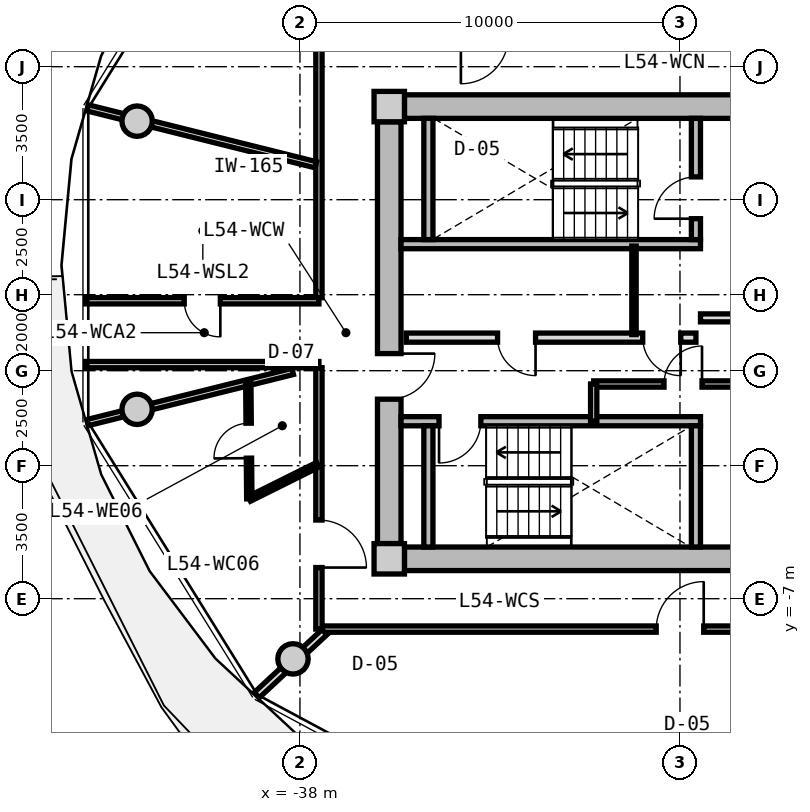
"""IFC4 building model, lengths in metres.
Left out: names, types, materials, properties, quantities, classifications, styles, units other than length and angle.
Written with IfcOpenShell. Run it as: python <this file> out.ifc"""

import sys

from ifc_helpers import new_model, si_unit, direction, frame, frame_2d, origin, origin_2d, place, context, subcontext, project, spatial, rectangle, circle, extrude, source, transform, mapped, element, fill, save


model = new_model("IFC4")
c1 = context("Model", 3, precision=1e-05, world=origin(), true_north=direction((0.0, 1.0)))
c2 = subcontext(c1, "Body", "Model", "MODEL_VIEW")
j1 = project(units=[si_unit("LENGTHUNIT", "METRE"), si_unit("PLANEANGLEUNIT", "RADIAN")], contexts=[c1])
p1 = place(None, origin())
s1 = spatial("IfcSite", under=j1, at=p1, CompositionType="ELEMENT")
p2 = place(p1, origin())
s2 = spatial("IfcBuilding", under=s1, at=p2, CompositionType="ELEMENT")
p3 = place(p2, frame((0.0, 0.0, 173.95)))
s3 = spatial("IfcBuildingStorey", under=s2, at=p3, CompositionType="ELEMENT", Elevation=173.95)
m1 = source(origin(), c2, "Body", "SweptSolid", [
    extrude(rectangle(XDim=0.8, YDim=0.8, at=origin_2d()), origin(), (0.0, 0.0, 1.0), 3.05),
])
for number, where, z_axis, x_axis in (
    (1, (-35.65, -5.95, 0.0), (0.0, 0.0, 1.0), (1.0, 0.0, 0.0)),
    (2, (-35.65, 5.95, 0.0), (0.0, 0.0, 1.0), (1.0, 0.0, 0.0)),
):
    element("IfcColumn", number, at=place(p3, frame(where, z_axis=z_axis, x_axis=x_axis)), inside=s3, PredefinedType="COLUMN", context=c2, shape_type="MappedRepresentation", body=[
        mapped(m1, transform((0.0, 0.0, 0.0), x_axis=(1.0, 0.0, 0.0), y_axis=(0.0, 1.0, 0.0), z_axis=(0.0, 0.0, 1.0), scale=1.0)),
    ])
m2 = source(origin(), c2, "Body", "SweptSolid", [
    extrude(rectangle(XDim=14.5, YDim=0.62, at=frame_2d((7.25, 0.0))), origin(), (0.0, 0.0, 1.0), 2.81),
])
for number, where, z_axis, x_axis in (
    (3, (-35.25, 5.95, 0.0), (0.0, 0.0, 1.0), (1.0, 0.0, 0.0)),
    (4, (-20.75, -5.95, 0.0), (0.0, 0.0, 1.0), (-1.0, 0.0, 0.0)),
):
    element("IfcWall", number, at=place(p3, frame(where, z_axis=z_axis, x_axis=x_axis)), inside=s3, PredefinedType="SHEAR", context=c2, shape_type="MappedRepresentation", body=[
        mapped(m2, transform((0.0, 0.0, 0.0), x_axis=(1.0, 0.0, 0.0), y_axis=(0.0, 1.0, 0.0), z_axis=(0.0, 0.0, 1.0), scale=1.0)),
    ])
m3 = source(origin(), c2, "Body", "SweptSolid", [
    extrude(rectangle(XDim=11.1, YDim=0.62, at=frame_2d((5.55, 0.0))), origin(), (0.0, 0.0, 1.0), 2.81),
])
p4 = place(p3, frame((-35.65, -5.55, 0.0), z_axis=(0.0, 0.0, 1.0), x_axis=(0.0, 1.0, 0.0)))
e5 = element("IfcWall", 5, at=p4, inside=s3, PredefinedType="SHEAR", context=c2, shape_type="MappedRepresentation", body=[
    mapped(m3, transform((0.0, 0.0, 0.0), x_axis=(1.0, 0.0, 0.0), y_axis=(0.0, 1.0, 0.0), z_axis=(0.0, 0.0, 1.0), scale=1.0)),
])
p5 = place(p4, frame((3.8, 0.0, 0.0)))
e6 = element("IfcOpeningElement", 6, at=p5, cuts=e5, PredefinedType="OPENING", context=c2, shape_type="SweptSolid", body=[
    extrude(rectangle(XDim=1.2, YDim=2.15, at=frame_2d((0.6, 1.075))), frame((0.0, 0.32, 0.0), z_axis=(0.0, -1.0, 0.0), x_axis=(1.0, 0.0, 0.0)), (0.0, 0.0, 1.0), 0.64),
])
m4 = source(origin(), c2, "Body", "SweptSolid", [
    extrude(circle(Radius=0.4, at=origin_2d()), origin(), (0.0, 0.0, 1.0), 3.05),
])
for number, where, z_axis, x_axis in (
    (7, (-42.285, 5.567, 0.0), (0.0, 0.0, 1.0), (1.0, 0.0, 0.0)),
    (8, (-42.285, -2.016, 0.0), (0.0, 0.0, 1.0), (1.0, 0.0, 0.0)),
    (9, (-38.183, -8.584, 0.0), (0.0, 0.0, 1.0), (1.0, 0.0, 0.0)),
):
    element("IfcColumn", number, at=place(p3, frame(where, z_axis=z_axis, x_axis=x_axis)), inside=s3, PredefinedType="COLUMN", context=c2, shape_type="MappedRepresentation", body=[
        mapped(m4, transform((0.0, 0.0, 0.0), x_axis=(1.0, 0.0, 0.0), y_axis=(0.0, 1.0, 0.0), z_axis=(0.0, 0.0, 1.0), scale=1.0)),
    ])
m5 = source(origin(), c2, "Body", "SweptSolid", [
    extrude(rectangle(XDim=7.88, YDim=0.24, at=frame_2d((3.94, 0.0))), origin(), (0.0, 0.0, 1.0), 2.81),
])
p6 = place(p3, frame((-35.34, 2.33, 0.0), z_axis=(0.0, 0.0, 1.0), x_axis=(1.0, 0.0, 0.0)))
e10 = element("IfcWall", 10, at=p6, inside=s3, PredefinedType="PARTITIONING", context=c2, shape_type="MappedRepresentation", body=[
    mapped(m5, transform((0.0, 0.0, 0.0), x_axis=(1.0, 0.0, 0.0), y_axis=(0.0, 1.0, 0.0), z_axis=(0.0, 0.0, 1.0), scale=1.0)),
])
m6 = source(origin(), c2, "Body", "SweptSolid", [
    extrude(rectangle(XDim=3.19, YDim=0.24, at=frame_2d((1.595, 0.0))), origin(), (0.0, 0.0, 1.0), 2.81),
])
p7 = place(p3, frame((-34.62, 2.45, 0.0), z_axis=(0.0, 0.0, 1.0), x_axis=(0.0, 1.0, 0.0)))
e11 = element("IfcWall", 11, at=p7, inside=s3, PredefinedType="PARTITIONING", context=c2, shape_type="MappedRepresentation", body=[
    mapped(m6, transform((0.0, 0.0, 0.0), x_axis=(1.0, 0.0, 0.0), y_axis=(0.0, 1.0, 0.0), z_axis=(0.0, 0.0, 1.0), scale=1.0)),
])
p8 = place(p3, frame((-27.58, 2.45, 0.0), z_axis=(0.0, 0.0, 1.0), x_axis=(0.0, 1.0, 0.0)))
e12 = element("IfcWall", 12, at=p8, inside=s3, PredefinedType="PARTITIONING", context=c2, shape_type="MappedRepresentation", body=[
    mapped(m6, transform((0.0, 0.0, 0.0), x_axis=(1.0, 0.0, 0.0), y_axis=(0.0, 1.0, 0.0), z_axis=(0.0, 0.0, 1.0), scale=1.0)),
])
p9 = place(p8, frame((0.55, 0.0, 0.0)))
e13 = element("IfcOpeningElement", 13, at=p9, cuts=e12, PredefinedType="OPENING", context=c2, shape_type="SweptSolid", body=[
    extrude(rectangle(XDim=1.1, YDim=2.15, at=frame_2d((0.55, 1.075))), frame((0.0, 0.13, 0.0), z_axis=(0.0, -1.0, 0.0), x_axis=(1.0, 0.0, 0.0)), (0.0, 0.0, 1.0), 0.26),
])
p10 = place(p3, frame((-35.34, -2.33, 0.0), z_axis=(0.0, 0.0, 1.0), x_axis=(1.0, 0.0, 0.0)))
e14 = element("IfcWall", 14, at=p10, inside=s3, PredefinedType="PARTITIONING", context=c2, shape_type="MappedRepresentation", body=[
    mapped(m5, transform((0.0, 0.0, 0.0), x_axis=(1.0, 0.0, 0.0), y_axis=(0.0, 1.0, 0.0), z_axis=(0.0, 0.0, 1.0), scale=1.0)),
])
p11 = place(p10, frame((1.0, 0.0, 0.0)))
e15 = element("IfcOpeningElement", 15, at=p11, cuts=e14, PredefinedType="OPENING", context=c2, shape_type="SweptSolid", body=[
    extrude(rectangle(XDim=1.1, YDim=2.15, at=frame_2d((0.55, 1.075))), frame((0.0, 0.13, 0.0), z_axis=(0.0, -1.0, 0.0), x_axis=(1.0, 0.0, 0.0)), (0.0, 0.0, 1.0), 0.26),
])
for number, where, z_axis, x_axis in (
    (16, (-34.62, -5.64, 0.0), (0.0, 0.0, 1.0), (0.0, 1.0, 0.0)),
    (17, (-27.58, -5.64, 0.0), (0.0, 0.0, 1.0), (0.0, 1.0, 0.0)),
):
    element("IfcWall", number, at=place(p3, frame(where, z_axis=z_axis, x_axis=x_axis)), inside=s3, PredefinedType="PARTITIONING", context=c2, shape_type="MappedRepresentation", body=[
        mapped(m6, transform((0.0, 0.0, 0.0), x_axis=(1.0, 0.0, 0.0), y_axis=(0.0, 1.0, 0.0), z_axis=(0.0, 0.0, 1.0), scale=1.0)),
    ])
m7 = source(origin(), c2, "Body", "SweptSolid", [
    extrude(rectangle(XDim=6.66, YDim=0.21, at=frame_2d((3.33, 0.0))), origin(), (0.0, 0.0, 1.0), 2.795),
])
p12 = place(p3, frame((-27.46, 0.39, 0.0), z_axis=(0.0, 0.0, 1.0), x_axis=(1.0, 0.0, 0.0)))
e18 = element("IfcWall", 18, at=p12, inside=s3, PredefinedType="PARTITIONING", context=c2, shape_type="MappedRepresentation", body=[
    mapped(m7, transform((0.0, 0.0, 0.0), x_axis=(1.0, 0.0, 0.0), y_axis=(0.0, 1.0, 0.0), z_axis=(0.0, 0.0, 1.0), scale=1.0)),
])
p13 = place(p12, frame((1.0, 0.0, 0.0)))
e19 = element("IfcOpeningElement", 19, at=p13, cuts=e18, PredefinedType="OPENING", context=c2, shape_type="SweptSolid", body=[
    extrude(rectangle(XDim=1.2, YDim=2.15, at=frame_2d((0.6, 1.075))), frame((0.0, 0.115, 0.0), z_axis=(0.0, -1.0, 0.0), x_axis=(1.0, 0.0, 0.0)), (0.0, 0.0, 1.0), 0.23),
])
m8 = source(origin(), c2, "Body", "SweptSolid", [
    extrude(rectangle(XDim=7.62, YDim=0.24, at=frame_2d((3.81, 0.0))), origin(), (0.0, 0.0, 1.0), 2.795),
])
p14 = place(p3, frame((-35.2, -0.13, 0.0), z_axis=(0.0, 0.0, 1.0), x_axis=(1.0, 0.0, 0.0)))
e20 = element("IfcWall", 20, at=p14, inside=s3, PredefinedType="PARTITIONING", context=c2, shape_type="MappedRepresentation", body=[
    mapped(m8, transform((0.0, 0.0, 0.0), x_axis=(1.0, 0.0, 0.0), y_axis=(0.0, 1.0, 0.0), z_axis=(0.0, 0.0, 1.0), scale=1.0)),
])
p15 = place(p14, frame((6.22, 0.0, 0.0)))
e21 = element("IfcOpeningElement", 21, at=p15, cuts=e20, PredefinedType="OPENING", context=c2, shape_type="SweptSolid", body=[
    extrude(rectangle(XDim=1.0, YDim=2.1, at=frame_2d((0.5, 1.05))), frame((0.0, 0.13, 0.0), z_axis=(0.0, -1.0, 0.0), x_axis=(1.0, 0.0, 0.0)), (0.0, 0.0, 1.0), 0.26),
])
p16 = place(p14, frame((2.4, 0.0, 0.0)))
e22 = element("IfcOpeningElement", 22, at=p16, cuts=e20, PredefinedType="OPENING", context=c2, shape_type="SweptSolid", body=[
    extrude(rectangle(XDim=1.0, YDim=2.1, at=frame_2d((0.5, 1.05))), frame((0.0, 0.13, 0.0), z_axis=(0.0, -1.0, 0.0), x_axis=(1.0, 0.0, 0.0)), (0.0, 0.0, 1.0), 0.26),
])
m9 = source(origin(), c2, "Body", "SweptSolid", [
    extrude(rectangle(XDim=2.33, YDim=0.115, at=frame_2d((1.165, 0.0))), origin(), (0.0, 0.0, 1.0), 2.795),
])
p17 = place(p3, frame((-29.21, -0.05, 0.0), z_axis=(0.0, 0.0, 1.0), x_axis=(0.0, 1.0, 0.0)))
e23 = element("IfcWall", 23, at=p17, inside=s3, PredefinedType="PARTITIONING", context=c2, shape_type="MappedRepresentation", body=[
    mapped(m9, transform((0.0, 0.0, 0.0), x_axis=(1.0, 0.0, 0.0), y_axis=(0.0, 1.0, 0.0), z_axis=(0.0, 0.0, 1.0), scale=1.0)),
])
m10 = source(origin(), c2, "Body", "SweptSolid", [
    extrude(rectangle(XDim=4.77, YDim=0.165, at=frame_2d((2.385, 0.0))), origin(), (0.0, 0.0, 1.0), 2.795),
])
p18 = place(p3, frame((-30.27, -1.35, 0.0), z_axis=(0.0, 0.0, 1.0), x_axis=(1.0, 0.0, 0.0)))
e24 = element("IfcWall", 24, at=p18, inside=s3, PredefinedType="PARTITIONING", context=c2, shape_type="MappedRepresentation", body=[
    mapped(m10, transform((0.0, 0.0, 0.0), x_axis=(1.0, 0.0, 0.0), y_axis=(0.0, 1.0, 0.0), z_axis=(0.0, 0.0, 1.0), scale=1.0)),
])
p19 = place(p18, frame((1.85, 0.0, 0.0)))
e25 = element("IfcOpeningElement", 25, at=p19, cuts=e24, PredefinedType="OPENING", context=c2, shape_type="SweptSolid", body=[
    extrude(rectangle(XDim=1.0, YDim=2.1, at=frame_2d((0.5, 1.05))), frame((0.0, 0.093, 0.0), z_axis=(0.0, -1.0, 0.0), x_axis=(1.0, 0.0, 0.0)), (0.0, 0.0, 1.0), 0.185),
])
m11 = source(origin(), c2, "Body", "SweptSolid", [
    extrude(rectangle(XDim=0.98, YDim=0.165, at=frame_2d((0.49, 0.0))), origin(), (0.0, 0.0, 1.0), 2.795),
])
p20 = place(p3, frame((-30.27, -2.33, 0.0), z_axis=(0.0, 0.0, 1.0), x_axis=(0.0, 1.0, 0.0)))
e26 = element("IfcWall", 26, at=p20, inside=s3, PredefinedType="PARTITIONING", context=c2, shape_type="MappedRepresentation", body=[
    mapped(m11, transform((0.0, 0.0, 0.0), x_axis=(1.0, 0.0, 0.0), y_axis=(0.0, 1.0, 0.0), z_axis=(0.0, 0.0, 1.0), scale=1.0)),
])
m12 = source(origin(), c2, "Body", "SweptSolid", [
    extrude(rectangle(XDim=19.0, YDim=0.165, at=frame_2d((9.5, 0.0))), origin(), (0.0, 0.0, 1.0), 2.795),
])
p21 = place(p3, frame((-18.5, -7.8, 0.0), z_axis=(0.0, 0.0, 1.0), x_axis=(-1.0, 0.0, 0.0)))
e27 = element("IfcWall", 27, at=p21, inside=s3, PredefinedType="PARTITIONING", context=c2, shape_type="MappedRepresentation", body=[
    mapped(m12, transform((0.0, 0.0, 0.0), x_axis=(1.0, 0.0, 0.0), y_axis=(0.0, 1.0, 0.0), z_axis=(0.0, 0.0, 1.0), scale=1.0)),
])
p22 = place(p21, frame((8.875, 0.0, 0.0)))
e28 = element("IfcOpeningElement", 28, at=p22, cuts=e27, PredefinedType="OPENING", context=c2, shape_type="SweptSolid", body=[
    extrude(rectangle(XDim=1.25, YDim=2.2, at=frame_2d((0.625, 1.1))), frame((0.0, 0.093, 0.0), z_axis=(0.0, -1.0, 0.0), x_axis=(1.0, 0.0, 0.0)), (0.0, 0.0, 1.0), 0.185),
])
m13 = source(origin(), c2, "Body", "SweptSolid", [
    extrude(rectangle(XDim=6.88, YDim=0.165, at=frame_2d((3.44, 0.0))), origin(), (0.0, 0.0, 1.0), 2.795),
])
p23 = place(p3, frame((-37.5, -7.8, 0.0), z_axis=(0.0, 0.0, 1.0), x_axis=(0.0, 1.0, 0.0)))
e29 = element("IfcWall", 29, at=p23, inside=s3, PredefinedType="PARTITIONING", context=c2, shape_type="MappedRepresentation", body=[
    mapped(m13, transform((0.0, 0.0, 0.0), x_axis=(1.0, 0.0, 0.0), y_axis=(0.0, 1.0, 0.0), z_axis=(0.0, 0.0, 1.0), scale=1.0)),
])
p24 = place(p23, frame((1.62, 0.0, 0.0)))
e30 = element("IfcOpeningElement", 30, at=p24, cuts=e29, PredefinedType="OPENING", context=c2, shape_type="SweptSolid", body=[
    extrude(rectangle(XDim=1.25, YDim=2.2, at=frame_2d((0.625, 1.1))), frame((0.0, 0.093, 0.0), z_axis=(0.0, -1.0, 0.0), x_axis=(1.0, 0.0, 0.0)), (0.0, 0.0, 1.0), 0.185),
])
p25 = place(p3, frame((-37.5, 0.92, 0.0), z_axis=(0.0, 0.0, 1.0), x_axis=(0.0, 1.0, 0.0)))
e31 = element("IfcWall", 31, at=p25, inside=s3, PredefinedType="PARTITIONING", context=c2, shape_type="MappedRepresentation", body=[
    mapped(m13, transform((0.0, 0.0, 0.0), x_axis=(1.0, 0.0, 0.0), y_axis=(0.0, 1.0, 0.0), z_axis=(0.0, 0.0, 1.0), scale=1.0)),
])
m14 = source(origin(), c2, "Body", "SweptSolid", [
    extrude(rectangle(XDim=6.193, YDim=0.165, at=frame_2d((3.096, 0.0))), origin(), (0.0, 0.0, 1.0), 2.345),
])
p26 = place(p3, frame((-37.58, 4.419, 0.0), z_axis=(0.0, 0.0, 1.0), x_axis=(-0.970309243466, 0.241867674657, 0.0)))
e32 = element("IfcWall", 32, at=p26, inside=s3, PredefinedType="PARTITIONING", context=c2, shape_type="MappedRepresentation", body=[
    mapped(m14, transform((0.0, 0.0, 0.0), x_axis=(1.0, 0.0, 0.0), y_axis=(0.0, 1.0, 0.0), z_axis=(0.0, 0.0, 1.0), scale=1.0)),
])
m15 = source(origin(), c2, "Body", "SweptSolid", [
    extrude(rectangle(XDim=5.564, YDim=0.165, at=frame_2d((2.782, 0.0))), origin(), (0.0, 0.0, 1.0), 2.345),
])
p27 = place(p3, frame((-38.19, -1.02, 0.0), z_axis=(0.0, 0.0, 1.0), x_axis=(-0.97031260977, -0.241854169533, 0.0)))
e33 = element("IfcWall", 33, at=p27, inside=s3, PredefinedType="PARTITIONING", context=c2, shape_type="MappedRepresentation", body=[
    mapped(m15, transform((0.0, 0.0, 0.0), x_axis=(1.0, 0.0, 0.0), y_axis=(0.0, 1.0, 0.0), z_axis=(0.0, 0.0, 1.0), scale=1.0)),
])
m16 = source(origin(), c2, "Body", "SweptSolid", [
    extrude(rectangle(XDim=6.139, YDim=0.165, at=frame_2d((3.069, 0.0))), origin(), (0.0, 0.0, 1.0), 2.795),
])
p28 = place(p3, frame((-43.639, 0.84, 0.0), z_axis=(0.0, 0.0, 1.0), x_axis=(1.0, 0.0, 0.0)))
e34 = element("IfcWall", 34, at=p28, inside=s3, PredefinedType="PARTITIONING", context=c2, shape_type="MappedRepresentation", body=[
    mapped(m16, transform((0.0, 0.0, 0.0), x_axis=(1.0, 0.0, 0.0), y_axis=(0.0, 1.0, 0.0), z_axis=(0.0, 0.0, 1.0), scale=1.0)),
])
p29 = place(p28, frame((2.594, 0.0, 0.0)))
e35 = element("IfcOpeningElement", 35, at=p29, cuts=e34, PredefinedType="OPENING", context=c2, shape_type="SweptSolid", body=[
    extrude(rectangle(XDim=0.95, YDim=2.1, at=frame_2d((0.475, 1.05))), frame((0.0, 0.093, 0.0), z_axis=(0.0, -1.0, 0.0), x_axis=(1.0, 0.0, 0.0)), (0.0, 0.0, 1.0), 0.185),
])
p30 = place(p3, frame((-37.5, -0.84, 0.0), z_axis=(0.0, 0.0, 1.0), x_axis=(-1.0, 0.0, 0.0)))
e36 = element("IfcWall", 36, at=p30, inside=s3, PredefinedType="PARTITIONING", context=c2, shape_type="MappedRepresentation", body=[
    mapped(m16, transform((0.0, 0.0, 0.0), x_axis=(1.0, 0.0, 0.0), y_axis=(0.0, 1.0, 0.0), z_axis=(0.0, 0.0, 1.0), scale=1.0)),
])
m17 = source(origin(), c2, "Body", "SweptSolid", [
    extrude(rectangle(XDim=2.435, YDim=0.19, at=frame_2d((1.217, 0.0))), origin(), (0.0, 0.0, 1.0), 2.345),
])
p31 = place(p3, frame((-37.354, -7.88, 0.0), z_axis=(0.0, 0.0, 1.0), x_axis=(-0.732164643118, -0.681127693878, 0.0)))
e37 = element("IfcWall", 37, at=p31, inside=s3, PredefinedType="PARTITIONING", context=c2, shape_type="MappedRepresentation", body=[
    mapped(m17, transform((0.0, 0.0, 0.0), x_axis=(1.0, 0.0, 0.0), y_axis=(0.0, 1.0, 0.0), z_axis=(0.0, 0.0, 1.0), scale=1.0)),
])
m18 = source(origin(), c2, "Body", "SweptSolid", [
    extrude(rectangle(XDim=2.013, YDim=0.14, at=frame_2d((1.006, 0.0))), origin(), (0.0, 0.0, 1.0), 2.795),
])
p32 = place(p3, frame((-37.53, -3.476, 0.0), z_axis=(0.0, 0.0, 1.0), x_axis=(-0.895347078862, -0.445369069843, 0.0)))
e38 = element("IfcWall", 38, at=p32, inside=s3, PredefinedType="PARTITIONING", context=c2, shape_type="MappedRepresentation", body=[
    mapped(m18, transform((0.0, 0.0, 0.0), x_axis=(1.0, 0.0, 0.0), y_axis=(0.0, 1.0, 0.0), z_axis=(0.0, 0.0, 1.0), scale=1.0)),
])
m19 = source(origin(), c2, "Body", "SweptSolid", [
    extrude(rectangle(XDim=3.062, YDim=0.14, at=frame_2d((1.531, 0.0))), origin(), (0.0, 0.0, 1.0), 2.795),
])
p33 = place(p3, frame((-39.332, -4.372, 0.0), z_axis=(0.0, 0.0, 1.0), x_axis=(-0.008691856662, 0.9999622251, 0.0)))
e39 = element("IfcWall", 39, at=p33, inside=s3, PredefinedType="PARTITIONING", context=c2, shape_type="MappedRepresentation", body=[
    mapped(m19, transform((0.0, 0.0, 0.0), x_axis=(1.0, 0.0, 0.0), y_axis=(0.0, 1.0, 0.0), z_axis=(0.0, 0.0, 1.0), scale=1.0)),
])
p34 = place(p33, frame((1.071, 0.0, 0.0)))
e40 = element("IfcOpeningElement", 40, at=p34, cuts=e39, PredefinedType="OPENING", context=c2, shape_type="SweptSolid", body=[
    extrude(rectangle(XDim=0.92, YDim=2.1, at=frame_2d((0.46, 1.05))), frame((0.0, 0.08, 0.0), z_axis=(0.0, -1.0, 0.0), x_axis=(1.0, 0.0, 0.0)), (0.0, 0.0, 1.0), 0.16),
])
m20 = source(origin(), c2, "Body", "SweptSolid", [
    extrude(rectangle(XDim=1.1, YDim=2.15, at=frame_2d((0.55, 1.075))), frame((0.0, 0.025, 0.0), z_axis=(0.0, -1.0, 0.0), x_axis=(1.0, 0.0, 0.0)), (0.0, 0.0, 1.0), 0.05),
])
p35 = place(p9, origin())
e41 = element("IfcDoor", 41, at=p35, inside=s3, OperationType="SINGLE_SWING_LEFT", PredefinedType="DOOR", context=c2, shape_type="MappedRepresentation", body=[
    mapped(m20, transform((0.0, 0.0, 0.0), x_axis=(1.0, 0.0, 0.0), y_axis=(0.0, 1.0, 0.0), z_axis=(0.0, 0.0, 1.0), scale=1.0)),
])
fill(e13, e41)
p36 = place(p11, frame((1.1, 0.0, 0.0), z_axis=(0.0, 0.0, 1.0), x_axis=(-1.0, 0.0, 0.0)))
e42 = element("IfcDoor", 42, at=p36, inside=s3, OperationType="SINGLE_SWING_RIGHT", PredefinedType="DOOR", context=c2, shape_type="MappedRepresentation", body=[
    mapped(m20, transform((0.0, 0.0, 0.0), x_axis=(1.0, 0.0, 0.0), y_axis=(0.0, 1.0, 0.0), z_axis=(0.0, 0.0, 1.0), scale=1.0)),
])
fill(e15, e42)
m21 = source(origin(), c2, "Body", "SweptSolid", [
    extrude(rectangle(XDim=1.2, YDim=2.15, at=frame_2d((0.6, 1.075))), frame((0.0, 0.025, 0.0), z_axis=(0.0, -1.0, 0.0), x_axis=(1.0, 0.0, 0.0)), (0.0, 0.0, 1.0), 0.05),
])
p37 = place(p5, frame((1.2, 0.0, 0.0), z_axis=(0.0, 0.0, 1.0), x_axis=(-1.0, 0.0, 0.0)))
e43 = element("IfcDoor", 43, at=p37, inside=s3, OperationType="SINGLE_SWING_LEFT", PredefinedType="DOOR", context=c2, shape_type="MappedRepresentation", body=[
    mapped(m21, transform((0.0, 0.0, 0.0), x_axis=(1.0, 0.0, 0.0), y_axis=(0.0, 1.0, 0.0), z_axis=(0.0, 0.0, 1.0), scale=1.0)),
])
fill(e6, e43)
m22 = source(origin(), c2, "Body", "SweptSolid", [
    extrude(rectangle(XDim=1.0, YDim=2.1, at=frame_2d((0.5, 1.05))), frame((0.0, 0.025, 0.0), z_axis=(0.0, -1.0, 0.0), x_axis=(1.0, 0.0, 0.0)), (0.0, 0.0, 1.0), 0.05),
])
p38 = place(p15, frame((1.0, 0.0, 0.0), z_axis=(0.0, 0.0, 1.0), x_axis=(-1.0, 0.0, 0.0)))
e44 = element("IfcDoor", 44, at=p38, inside=s3, OperationType="SINGLE_SWING_LEFT", PredefinedType="DOOR", context=c2, shape_type="MappedRepresentation", body=[
    mapped(m22, transform((0.0, 0.0, 0.0), x_axis=(1.0, 0.0, 0.0), y_axis=(0.0, 1.0, 0.0), z_axis=(0.0, 0.0, 1.0), scale=1.0)),
])
fill(e21, e44)
p39 = place(p16, frame((1.0, 0.0, 0.0), z_axis=(0.0, 0.0, 1.0), x_axis=(-1.0, 0.0, 0.0)))
e45 = element("IfcDoor", 45, at=p39, inside=s3, OperationType="SINGLE_SWING_LEFT", PredefinedType="DOOR", context=c2, shape_type="MappedRepresentation", body=[
    mapped(m22, transform((0.0, 0.0, 0.0), x_axis=(1.0, 0.0, 0.0), y_axis=(0.0, 1.0, 0.0), z_axis=(0.0, 0.0, 1.0), scale=1.0)),
])
fill(e22, e45)
p40 = place(p19, origin())
e46 = element("IfcDoor", 46, at=p40, inside=s3, OperationType="SINGLE_SWING_RIGHT", PredefinedType="DOOR", context=c2, shape_type="MappedRepresentation", body=[
    mapped(m22, transform((0.0, 0.0, 0.0), x_axis=(1.0, 0.0, 0.0), y_axis=(0.0, 1.0, 0.0), z_axis=(0.0, 0.0, 1.0), scale=1.0)),
])
fill(e25, e46)
m23 = source(origin(), c2, "Body", "SweptSolid", [
    extrude(rectangle(XDim=0.95, YDim=2.1, at=frame_2d((0.475, 1.05))), frame((0.0, 0.025, 0.0), z_axis=(0.0, -1.0, 0.0), x_axis=(1.0, 0.0, 0.0)), (0.0, 0.0, 1.0), 0.05),
])
p41 = place(p29, frame((0.95, 0.0, 0.0), z_axis=(0.0, 0.0, 1.0), x_axis=(-1.0, 0.0, 0.0)))
e47 = element("IfcDoor", 47, at=p41, inside=s3, OperationType="SINGLE_SWING_LEFT", PredefinedType="DOOR", context=c2, shape_type="MappedRepresentation", body=[
    mapped(m23, transform((0.0, 0.0, 0.0), x_axis=(1.0, 0.0, 0.0), y_axis=(0.0, 1.0, 0.0), z_axis=(0.0, 0.0, 1.0), scale=1.0)),
])
fill(e35, e47)
m24 = source(origin(), c2, "Body", "SweptSolid", [
    extrude(rectangle(XDim=1.25, YDim=2.2, at=frame_2d((0.625, 1.1))), frame((0.0, 0.025, 0.0), z_axis=(0.0, -1.0, 0.0), x_axis=(1.0, 0.0, 0.0)), (0.0, 0.0, 1.0), 0.05),
])
p42 = place(p24, frame((1.25, 0.0, 0.0), z_axis=(0.0, 0.0, 1.0), x_axis=(-1.0, 0.0, 0.0)))
e48 = element("IfcDoor", 48, at=p42, inside=s3, OperationType="SINGLE_SWING_RIGHT", PredefinedType="DOOR", context=c2, shape_type="MappedRepresentation", body=[
    mapped(m24, transform((0.0, 0.0, 0.0), x_axis=(1.0, 0.0, 0.0), y_axis=(0.0, 1.0, 0.0), z_axis=(0.0, 0.0, 1.0), scale=1.0)),
])
fill(e30, e48)
m25 = source(origin(), c2, "Body", "SweptSolid", [
    extrude(rectangle(XDim=0.92, YDim=2.1, at=frame_2d((0.46, 1.05))), frame((0.0, 0.025, 0.0), z_axis=(0.0, -1.0, 0.0), x_axis=(1.0, 0.0, 0.0)), (0.0, 0.0, 1.0), 0.05),
])
p43 = place(p34, origin())
e49 = element("IfcDoor", 49, at=p43, inside=s3, OperationType="SINGLE_SWING_LEFT", PredefinedType="DOOR", context=c2, shape_type="MappedRepresentation", body=[
    mapped(m25, transform((0.0, 0.0, 0.0), x_axis=(1.0, 0.0, 0.0), y_axis=(0.0, 1.0, 0.0), z_axis=(0.0, 0.0, 1.0), scale=1.0)),
])
fill(e40, e49)
p44 = place(p22, frame((1.25, 0.0, 0.0), z_axis=(0.0, 0.0, 1.0), x_axis=(-1.0, 0.0, 0.0)))
e50 = element("IfcDoor", 50, at=p44, inside=s3, OperationType="SINGLE_SWING_RIGHT", PredefinedType="DOOR", context=c2, shape_type="MappedRepresentation", body=[
    mapped(m24, transform((0.0, 0.0, 0.0), x_axis=(1.0, 0.0, 0.0), y_axis=(0.0, 1.0, 0.0), z_axis=(0.0, 0.0, 1.0), scale=1.0)),
])
fill(e28, e50)
save(model, sys.argv[1])
